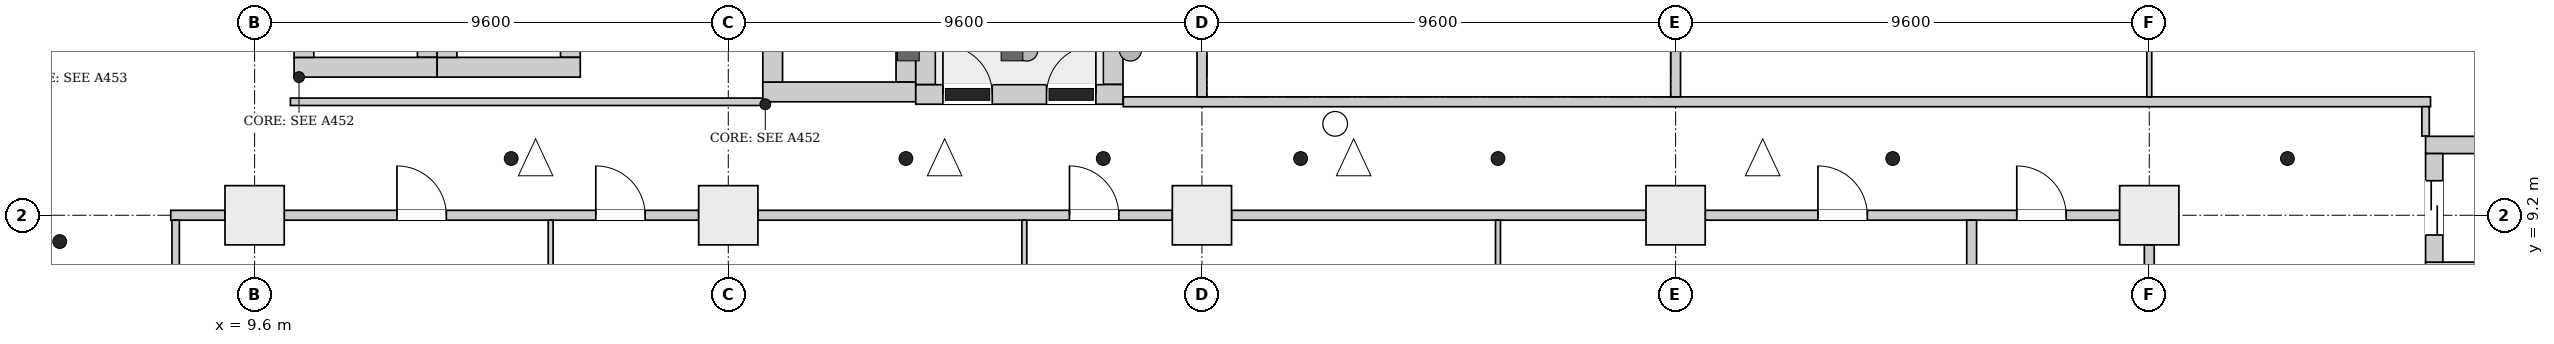
"""IFC4 building model, lengths in metres.
Left out: names, types, materials, properties, quantities, classifications, styles, units other than length and angle.
Written with IfcOpenShell. Run it as: python <this file> out.ifc"""

import sys

from ifc_helpers import new_model, si_unit, direction, frame, frame_2d, origin, origin_2d, place, context, subcontext, project, spatial, rectangle, extrude, element, fill, save


model = new_model("IFC4")
c1 = context("Model", 3, precision=1e-05, world=origin(), true_north=direction((0.0, 1.0)))
c2 = subcontext(c1, "Body", "Model", "MODEL_VIEW")
j1 = project(units=[si_unit("LENGTHUNIT", "METRE"), si_unit("PLANEANGLEUNIT", "RADIAN")], contexts=[c1])
p1 = place(None, origin())
s1 = spatial("IfcSite", under=j1, at=p1, CompositionType="ELEMENT")
p2 = place(p1, origin())
s2 = spatial("IfcBuilding", under=s1, at=p2, CompositionType="ELEMENT")
p3 = place(p2, frame((0.0, 0.0, 14.2)))
s3 = spatial("IfcBuildingStorey", under=s2, at=p3, CompositionType="ELEMENT", Elevation=14.2)
p4 = place(p3, frame((23.0, 11.65, 0.0), z_axis=(0.0, 0.0, 1.0), x_axis=(1.0, 0.0, 0.0)))
e1 = element("IfcWall", 1, at=p4, inside=s3, PredefinedType="SHEAR", context=c2, shape_type="SweptSolid", body=[
    extrude(rectangle(XDim=4.2, YDim=0.4, at=frame_2d((2.1, 0.0))), origin(), (0.0, 0.0, 1.0), 7.5),
])
p5 = place(p4, frame((0.55, 0.0, 0.0)))
e2 = element("IfcOpeningElement", 2, at=p5, cuts=e1, PredefinedType="OPENING", context=c2, shape_type="SweptSolid", body=[
    extrude(rectangle(XDim=1.0, YDim=2.1, at=frame_2d((0.5, 1.05))), frame((0.0, 0.21, 0.0), z_axis=(0.0, -1.0, 0.0), x_axis=(1.0, 0.0, 0.0)), (0.0, 0.0, 1.0), 0.42),
])
p6 = place(p4, frame((2.65, 0.0, 0.0)))
e3 = element("IfcOpeningElement", 3, at=p6, cuts=e1, PredefinedType="OPENING", context=c2, shape_type="SweptSolid", body=[
    extrude(rectangle(XDim=1.0, YDim=2.1, at=frame_2d((0.5, 1.05))), frame((0.0, 0.21, 0.0), z_axis=(0.0, -1.0, 0.0), x_axis=(1.0, 0.0, 0.0)), (0.0, 0.0, 1.0), 0.42),
])
for number, where, z_axis, x_axis in (
    (4, (23.2, 11.85, 0.0), (0.0, 0.0, 1.0), (0.0, 1.0, 0.0)),
    (5, (27.0, 11.85, 0.0), (0.0, 0.0, 1.0), (0.0, 1.0, 0.0)),
):
    element("IfcWall", number, at=place(p3, frame(where, z_axis=z_axis, x_axis=x_axis)), inside=s3, PredefinedType="SHEAR", context=c2, shape_type="SweptSolid", body=[
        extrude(rectangle(XDim=6.6, YDim=0.4, at=frame_2d((3.3, 0.0))), origin(), (0.0, 0.0, 1.0), 7.5),
    ])
for number, where, z_axis, x_axis in (
    (6, (53.6, 8.075, 0.0), (0.0, 0.0, 1.0), (1.0, 0.0, 0.0)),
    (7, (53.6, 10.625, 0.0), (0.0, 0.0, 1.0), (1.0, 0.0, 0.0)),
):
    element("IfcWall", number, at=place(p3, frame(where, z_axis=z_axis, x_axis=x_axis)), inside=s3, PredefinedType="SHEAR", context=c2, shape_type="SweptSolid", body=[
        extrude(rectangle(XDim=3.8, YDim=0.35, at=frame_2d((1.9, 0.0))), origin(), (0.0, 0.0, 1.0), 7.5),
    ])
p7 = place(p3, frame((53.775, 8.25, 0.0), z_axis=(0.0, 0.0, 1.0), x_axis=(0.0, 1.0, 0.0)))
e8 = element("IfcWall", 8, at=p7, inside=s3, PredefinedType="SHEAR", context=c2, shape_type="SweptSolid", body=[
    extrude(rectangle(XDim=2.2, YDim=0.35, at=frame_2d((1.1, 0.0))), origin(), (0.0, 0.0, 1.0), 7.5),
])
p8 = place(p7, frame((0.55, 0.0, 0.0)))
e9 = element("IfcOpeningElement", 9, at=p8, cuts=e8, PredefinedType="OPENING", context=c2, shape_type="SweptSolid", body=[
    extrude(rectangle(XDim=1.1, YDim=2.1, at=frame_2d((0.55, 1.05))), frame((0.0, 0.185, 0.0), z_axis=(0.0, -1.0, 0.0), x_axis=(1.0, 0.0, 0.0)), (0.0, 0.0, 1.0), 0.37),
])
p9 = place(p3, frame((10.4, 12.2, 0.0), z_axis=(0.0, 0.0, 1.0), x_axis=(1.0, 0.0, 0.0)))
e10 = element("IfcWall", 10, at=p9, inside=s3, PredefinedType="SHEAR", context=c2, shape_type="SweptSolid", body=[
    extrude(rectangle(XDim=2.9, YDim=0.4, at=frame_2d((1.45, 0.0))), origin(), (0.0, 0.0, 1.0), 7.5),
])
for number, where, z_axis, x_axis in (
    (11, (10.6, 12.4, 0.0), (0.0, 0.0, 1.0), (0.0, 1.0, 0.0)),
    (12, (13.1, 12.4, 0.0), (0.0, 0.0, 1.0), (0.0, 1.0, 0.0)),
):
    element("IfcWall", number, at=place(p3, frame(where, z_axis=z_axis, x_axis=x_axis)), inside=s3, PredefinedType="SHEAR", context=c2, shape_type="SweptSolid", body=[
        extrude(rectangle(XDim=3.0, YDim=0.4, at=frame_2d((1.5, 0.0))), origin(), (0.0, 0.0, 1.0), 7.5),
    ])
p10 = place(p3, frame((13.3, 12.2, 0.0), z_axis=(0.0, 0.0, 1.0), x_axis=(1.0, 0.0, 0.0)))
e13 = element("IfcWall", 13, at=p10, inside=s3, PredefinedType="SHEAR", context=c2, shape_type="SweptSolid", body=[
    extrude(rectangle(XDim=2.9, YDim=0.4, at=frame_2d((1.45, 0.0))), origin(), (0.0, 0.0, 1.0), 7.5),
])
for number, where, z_axis, x_axis in (
    (14, (13.5, 12.4, 0.0), (0.0, 0.0, 1.0), (0.0, 1.0, 0.0)),
    (15, (16.0, 12.4, 0.0), (0.0, 0.0, 1.0), (0.0, 1.0, 0.0)),
):
    element("IfcWall", number, at=place(p3, frame(where, z_axis=z_axis, x_axis=x_axis)), inside=s3, PredefinedType="SHEAR", context=c2, shape_type="SweptSolid", body=[
        extrude(rectangle(XDim=3.0, YDim=0.4, at=frame_2d((1.5, 0.0))), origin(), (0.0, 0.0, 1.0), 7.5),
    ])
p11 = place(p3, frame((19.9, 11.7, 0.0), z_axis=(0.0, 0.0, 1.0), x_axis=(1.0, 0.0, 0.0)))
e16 = element("IfcWall", 16, at=p11, inside=s3, PredefinedType="SHEAR", context=c2, shape_type="SweptSolid", body=[
    extrude(rectangle(XDim=3.1, YDim=0.4, at=frame_2d((1.55, 0.0))), origin(), (0.0, 0.0, 1.0), 7.5),
])
for number, where, z_axis, x_axis in (
    (17, (20.1, 11.9, 0.0), (0.0, 0.0, 1.0), (0.0, 1.0, 0.0)),
    (18, (22.8, 11.9, 0.0), (0.0, 0.0, 1.0), (0.0, 1.0, 0.0)),
):
    element("IfcWall", number, at=place(p3, frame(where, z_axis=z_axis, x_axis=x_axis)), inside=s3, PredefinedType="SHEAR", context=c2, shape_type="SweptSolid", body=[
        extrude(rectangle(XDim=3.4, YDim=0.4, at=frame_2d((1.7, 0.0))), origin(), (0.0, 0.0, 1.0), 7.5),
    ])
for number, where, z_axis, x_axis in (
    (19, (9.6, 9.2, 0.0), (0.0, 0.0, 1.0), (1.0, 0.0, 0.0)),
    (20, (19.2, 9.2, 0.0), (0.0, 0.0, 1.0), (1.0, 0.0, 0.0)),
    (21, (28.8, 9.2, 0.0), (0.0, 0.0, 1.0), (1.0, 0.0, 0.0)),
    (22, (38.4, 9.2, 0.0), (0.0, 0.0, 1.0), (1.0, 0.0, 0.0)),
    (23, (48.0, 9.2, 0.0), (0.0, 0.0, 1.0), (1.0, 0.0, 0.0)),
):
    element("IfcColumn", number, at=place(p3, frame(where, z_axis=z_axis, x_axis=x_axis)), inside=s3, PredefinedType="COLUMN", context=c2, shape_type="SweptSolid", body=[
        extrude(rectangle(XDim=1.2, YDim=1.2, at=origin_2d()), origin(), (0.0, 0.0, 1.0), 7.5),
    ])
p12 = place(p3, frame((7.9, 9.2, 0.0), z_axis=(0.0, 0.0, 1.0), x_axis=(1.0, 0.0, 0.0)))
e24 = element("IfcWall", 24, at=p12, inside=s3, PredefinedType="PARTITIONING", context=c2, shape_type="SweptSolid", body=[
    extrude(rectangle(XDim=1.1, YDim=0.2, at=frame_2d((0.55, 0.0))), origin(), (0.0, 0.0, 1.0), 6.75),
])
p13 = place(p3, frame((8.0, 0.206, 0.0), z_axis=(0.0, 0.0, 1.0), x_axis=(0.0, 1.0, 0.0)))
e25 = element("IfcWall", 25, at=p13, inside=s3, PredefinedType="PARTITIONING", context=c2, shape_type="SweptSolid", body=[
    extrude(rectangle(XDim=8.894, YDim=0.15, at=frame_2d((4.447, 0.0))), origin(), (0.0, 0.0, 1.0), 7.15),
])
p14 = place(p3, frame((10.2, 9.2, 0.0), z_axis=(0.0, 0.0, 1.0), x_axis=(1.0, 0.0, 0.0)))
e26 = element("IfcWall", 26, at=p14, inside=s3, PredefinedType="PARTITIONING", context=c2, shape_type="SweptSolid", body=[
    extrude(rectangle(XDim=8.4, YDim=0.2, at=frame_2d((4.2, 0.0))), origin(), (0.0, 0.0, 1.0), 6.75),
])
p15 = place(p14, frame((2.285, 0.0, 0.0)))
e27 = element("IfcOpeningElement", 27, at=p15, cuts=e26, PredefinedType="OPENING", context=c2, shape_type="SweptSolid", body=[
    extrude(rectangle(XDim=1.0, YDim=2.1, at=frame_2d((0.5, 1.05))), frame((0.0, 0.11, 0.0), z_axis=(0.0, -1.0, 0.0), x_axis=(1.0, 0.0, 0.0)), (0.0, 0.0, 1.0), 0.22),
])
p16 = place(p14, frame((6.315, 0.0, 0.0)))
e28 = element("IfcOpeningElement", 28, at=p16, cuts=e26, PredefinedType="OPENING", context=c2, shape_type="SweptSolid", body=[
    extrude(rectangle(XDim=1.0, YDim=2.1, at=frame_2d((0.5, 1.05))), frame((0.0, 0.11, 0.0), z_axis=(0.0, -1.0, 0.0), x_axis=(1.0, 0.0, 0.0)), (0.0, 0.0, 1.0), 0.22),
])
p17 = place(p3, frame((10.325, 11.5, 0.0), z_axis=(0.0, 0.0, 1.0), x_axis=(1.0, 0.0, 0.0)))
e29 = element("IfcWall", 29, at=p17, inside=s3, PredefinedType="PARTITIONING", context=c2, shape_type="SweptSolid", body=[
    extrude(rectangle(XDim=9.569, YDim=0.15, at=frame_2d((4.785, 0.0))), origin(), (0.0, 0.0, 1.0), 7.15),
])
p18 = place(p3, frame((15.6, 0.206, 0.0), z_axis=(0.0, 0.0, 1.0), x_axis=(0.0, 1.0, 0.0)))
e30 = element("IfcWall", 30, at=p18, inside=s3, PredefinedType="PARTITIONING", context=c2, shape_type="SweptSolid", body=[
    extrude(rectangle(XDim=8.894, YDim=0.1, at=frame_2d((4.447, 0.0))), origin(), (0.0, 0.0, 1.0), 7.15),
])
p19 = place(p3, frame((19.8, 9.2, 0.0), z_axis=(0.0, 0.0, 1.0), x_axis=(1.0, 0.0, 0.0)))
e31 = element("IfcWall", 31, at=p19, inside=s3, PredefinedType="PARTITIONING", context=c2, shape_type="SweptSolid", body=[
    extrude(rectangle(XDim=8.4, YDim=0.2, at=frame_2d((4.2, 0.0))), origin(), (0.0, 0.0, 1.0), 6.75),
])
p20 = place(p19, frame((6.315, 0.0, 0.0)))
e32 = element("IfcOpeningElement", 32, at=p20, cuts=e31, PredefinedType="OPENING", context=c2, shape_type="SweptSolid", body=[
    extrude(rectangle(XDim=1.0, YDim=2.1, at=frame_2d((0.5, 1.05))), frame((0.0, 0.11, 0.0), z_axis=(0.0, -1.0, 0.0), x_axis=(1.0, 0.0, 0.0)), (0.0, 0.0, 1.0), 0.22),
])
p21 = place(p3, frame((25.2, 0.206, 0.0), z_axis=(0.0, 0.0, 1.0), x_axis=(0.0, 1.0, 0.0)))
e33 = element("IfcWall", 33, at=p21, inside=s3, PredefinedType="PARTITIONING", context=c2, shape_type="SweptSolid", body=[
    extrude(rectangle(XDim=8.894, YDim=0.1, at=frame_2d((4.447, 0.0))), origin(), (0.0, 0.0, 1.0), 7.15),
])
p22 = place(p3, frame((27.206, 11.5, 0.0), z_axis=(0.0, 0.0, 1.0), x_axis=(1.0, 0.0, 0.0)))
e34 = element("IfcWall", 34, at=p22, inside=s3, PredefinedType="PARTITIONING", context=c2, shape_type="SweptSolid", body=[
    extrude(rectangle(XDim=26.494, YDim=0.2, at=frame_2d((13.247, 0.0))), origin(), (0.0, 0.0, 1.0), 7.15),
])
p23 = place(p3, frame((28.8, 11.6, 0.0), z_axis=(0.0, 0.0, 1.0), x_axis=(0.0, 1.0, 0.0)))
e35 = element("IfcWall", 35, at=p23, inside=s3, PredefinedType="PARTITIONING", context=c2, shape_type="SweptSolid", body=[
    extrude(rectangle(XDim=4.0, YDim=0.2, at=frame_2d((2.0, 0.0))), origin(), (0.0, 0.0, 1.0), 6.75),
])
p24 = place(p3, frame((29.4, 9.2, 0.0), z_axis=(0.0, 0.0, 1.0), x_axis=(1.0, 0.0, 0.0)))
e36 = element("IfcWall", 36, at=p24, inside=s3, PredefinedType="PARTITIONING", context=c2, shape_type="SweptSolid", body=[
    extrude(rectangle(XDim=8.4, YDim=0.2, at=frame_2d((4.2, 0.0))), origin(), (0.0, 0.0, 1.0), 6.75),
])
p25 = place(p3, frame((34.8, 0.206, 0.0), z_axis=(0.0, 0.0, 1.0), x_axis=(0.0, 1.0, 0.0)))
e37 = element("IfcWall", 37, at=p25, inside=s3, PredefinedType="PARTITIONING", context=c2, shape_type="SweptSolid", body=[
    extrude(rectangle(XDim=8.894, YDim=0.1, at=frame_2d((4.447, 0.0))), origin(), (0.0, 0.0, 1.0), 7.15),
])
p26 = place(p3, frame((38.4, 11.6, 0.0), z_axis=(0.0, 0.0, 1.0), x_axis=(0.0, 1.0, 0.0)))
e38 = element("IfcWall", 38, at=p26, inside=s3, PredefinedType="PARTITIONING", context=c2, shape_type="SweptSolid", body=[
    extrude(rectangle(XDim=6.2, YDim=0.2, at=frame_2d((3.1, 0.0))), origin(), (0.0, 0.0, 1.0), 6.75),
])
p27 = place(p3, frame((39.0, 9.2, 0.0), z_axis=(0.0, 0.0, 1.0), x_axis=(1.0, 0.0, 0.0)))
e39 = element("IfcWall", 39, at=p27, inside=s3, PredefinedType="PARTITIONING", context=c2, shape_type="SweptSolid", body=[
    extrude(rectangle(XDim=8.4, YDim=0.2, at=frame_2d((4.2, 0.0))), origin(), (0.0, 0.0, 1.0), 6.75),
])
p28 = place(p27, frame((2.285, 0.0, 0.0)))
e40 = element("IfcOpeningElement", 40, at=p28, cuts=e39, PredefinedType="OPENING", context=c2, shape_type="SweptSolid", body=[
    extrude(rectangle(XDim=1.0, YDim=2.1, at=frame_2d((0.5, 1.05))), frame((0.0, 0.11, 0.0), z_axis=(0.0, -1.0, 0.0), x_axis=(1.0, 0.0, 0.0)), (0.0, 0.0, 1.0), 0.22),
])
p29 = place(p27, frame((6.315, 0.0, 0.0)))
e41 = element("IfcOpeningElement", 41, at=p29, cuts=e39, PredefinedType="OPENING", context=c2, shape_type="SweptSolid", body=[
    extrude(rectangle(XDim=1.0, YDim=2.1, at=frame_2d((0.5, 1.05))), frame((0.0, 0.11, 0.0), z_axis=(0.0, -1.0, 0.0), x_axis=(1.0, 0.0, 0.0)), (0.0, 0.0, 1.0), 0.22),
])
p30 = place(p3, frame((44.4, 0.206, 0.0), z_axis=(0.0, 0.0, 1.0), x_axis=(0.0, 1.0, 0.0)))
e42 = element("IfcWall", 42, at=p30, inside=s3, PredefinedType="PARTITIONING", context=c2, shape_type="SweptSolid", body=[
    extrude(rectangle(XDim=8.894, YDim=0.2, at=frame_2d((4.447, 0.0))), origin(), (0.0, 0.0, 1.0), 7.15),
])
p31 = place(p3, frame((48.0, 1.05, 0.0), z_axis=(0.0, 0.0, 1.0), x_axis=(0.0, 1.0, 0.0)))
e43 = element("IfcWall", 43, at=p31, inside=s3, PredefinedType="PARTITIONING", context=c2, shape_type="SweptSolid", body=[
    extrude(rectangle(XDim=7.55, YDim=0.2, at=frame_2d((3.775, 0.0))), origin(), (0.0, 0.0, 1.0), 6.75),
])
p32 = place(p3, frame((48.0, 11.6, 0.0), z_axis=(0.0, 0.0, 1.0), x_axis=(0.0, 1.0, 0.0)))
e44 = element("IfcWall", 44, at=p32, inside=s3, PredefinedType="PARTITIONING", context=c2, shape_type="SweptSolid", body=[
    extrude(rectangle(XDim=6.2, YDim=0.1, at=frame_2d((3.1, 0.0))), origin(), (0.0, 0.0, 1.0), 6.75),
])
p33 = place(p3, frame((53.6, 10.806, 0.0), z_axis=(0.0, 0.0, 1.0), x_axis=(0.0, 1.0, 0.0)))
e45 = element("IfcWall", 45, at=p33, inside=s3, PredefinedType="PARTITIONING", context=c2, shape_type="SweptSolid", body=[
    extrude(rectangle(XDim=0.594, YDim=0.15, at=frame_2d((0.297, 0.0))), origin(), (0.0, 0.0, 1.0), 7.15),
])
p34 = place(p5, origin())
e46 = element("IfcDoor", 46, at=p34, inside=s3, OperationType="SINGLE_SWING_RIGHT", PredefinedType="DOOR", context=c2, shape_type="SweptSolid", body=[
    extrude(rectangle(XDim=1.0, YDim=2.1, at=frame_2d((0.5, 1.05))), frame((0.0, 0.025, 0.0), z_axis=(0.0, -1.0, 0.0), x_axis=(1.0, 0.0, 0.0)), (0.0, 0.0, 1.0), 0.05),
])
fill(e2, e46)
p35 = place(p6, origin())
e47 = element("IfcDoor", 47, at=p35, inside=s3, OperationType="SINGLE_SWING_LEFT", PredefinedType="DOOR", context=c2, shape_type="SweptSolid", body=[
    extrude(rectangle(XDim=1.0, YDim=2.1, at=frame_2d((0.5, 1.05))), frame((0.0, 0.025, 0.0), z_axis=(0.0, -1.0, 0.0), x_axis=(1.0, 0.0, 0.0)), (0.0, 0.0, 1.0), 0.05),
])
fill(e3, e47)
p36 = place(p8, origin())
e48 = element("IfcDoor", 48, at=p36, inside=s3, OperationType="DOUBLE_DOOR_SLIDING", PredefinedType="DOOR", context=c2, shape_type="SweptSolid", body=[
    extrude(rectangle(XDim=1.1, YDim=2.1, at=frame_2d((0.55, 1.05))), frame((0.0, 0.025, 0.0), z_axis=(0.0, -1.0, 0.0), x_axis=(1.0, 0.0, 0.0)), (0.0, 0.0, 1.0), 0.05),
])
fill(e9, e48)
p37 = place(p15, origin())
e49 = element("IfcDoor", 49, at=p37, inside=s3, OperationType="SINGLE_SWING_RIGHT", PredefinedType="DOOR", context=c2, shape_type="SweptSolid", body=[
    extrude(rectangle(XDim=1.0, YDim=2.1, at=frame_2d((0.5, 1.05))), frame((0.0, 0.025, 0.0), z_axis=(0.0, -1.0, 0.0), x_axis=(1.0, 0.0, 0.0)), (0.0, 0.0, 1.0), 0.05),
])
fill(e27, e49)
p38 = place(p16, origin())
e50 = element("IfcDoor", 50, at=p38, inside=s3, OperationType="SINGLE_SWING_LEFT", PredefinedType="DOOR", context=c2, shape_type="SweptSolid", body=[
    extrude(rectangle(XDim=1.0, YDim=2.1, at=frame_2d((0.5, 1.05))), frame((0.0, 0.025, 0.0), z_axis=(0.0, -1.0, 0.0), x_axis=(1.0, 0.0, 0.0)), (0.0, 0.0, 1.0), 0.05),
])
fill(e28, e50)
p39 = place(p20, origin())
e51 = element("IfcDoor", 51, at=p39, inside=s3, OperationType="SINGLE_SWING_LEFT", PredefinedType="DOOR", context=c2, shape_type="SweptSolid", body=[
    extrude(rectangle(XDim=1.0, YDim=2.1, at=frame_2d((0.5, 1.05))), frame((0.0, 0.025, 0.0), z_axis=(0.0, -1.0, 0.0), x_axis=(1.0, 0.0, 0.0)), (0.0, 0.0, 1.0), 0.05),
])
fill(e32, e51)
p40 = place(p28, origin())
e52 = element("IfcDoor", 52, at=p40, inside=s3, OperationType="SINGLE_SWING_RIGHT", PredefinedType="DOOR", context=c2, shape_type="SweptSolid", body=[
    extrude(rectangle(XDim=1.0, YDim=2.1, at=frame_2d((0.5, 1.05))), frame((0.0, 0.025, 0.0), z_axis=(0.0, -1.0, 0.0), x_axis=(1.0, 0.0, 0.0)), (0.0, 0.0, 1.0), 0.05),
])
fill(e40, e52)
p41 = place(p29, origin())
e53 = element("IfcDoor", 53, at=p41, inside=s3, OperationType="SINGLE_SWING_RIGHT", PredefinedType="DOOR", context=c2, shape_type="SweptSolid", body=[
    extrude(rectangle(XDim=1.0, YDim=2.1, at=frame_2d((0.5, 1.05))), frame((0.0, 0.025, 0.0), z_axis=(0.0, -1.0, 0.0), x_axis=(1.0, 0.0, 0.0)), (0.0, 0.0, 1.0), 0.05),
])
fill(e41, e53)
save(model, sys.argv[1])
